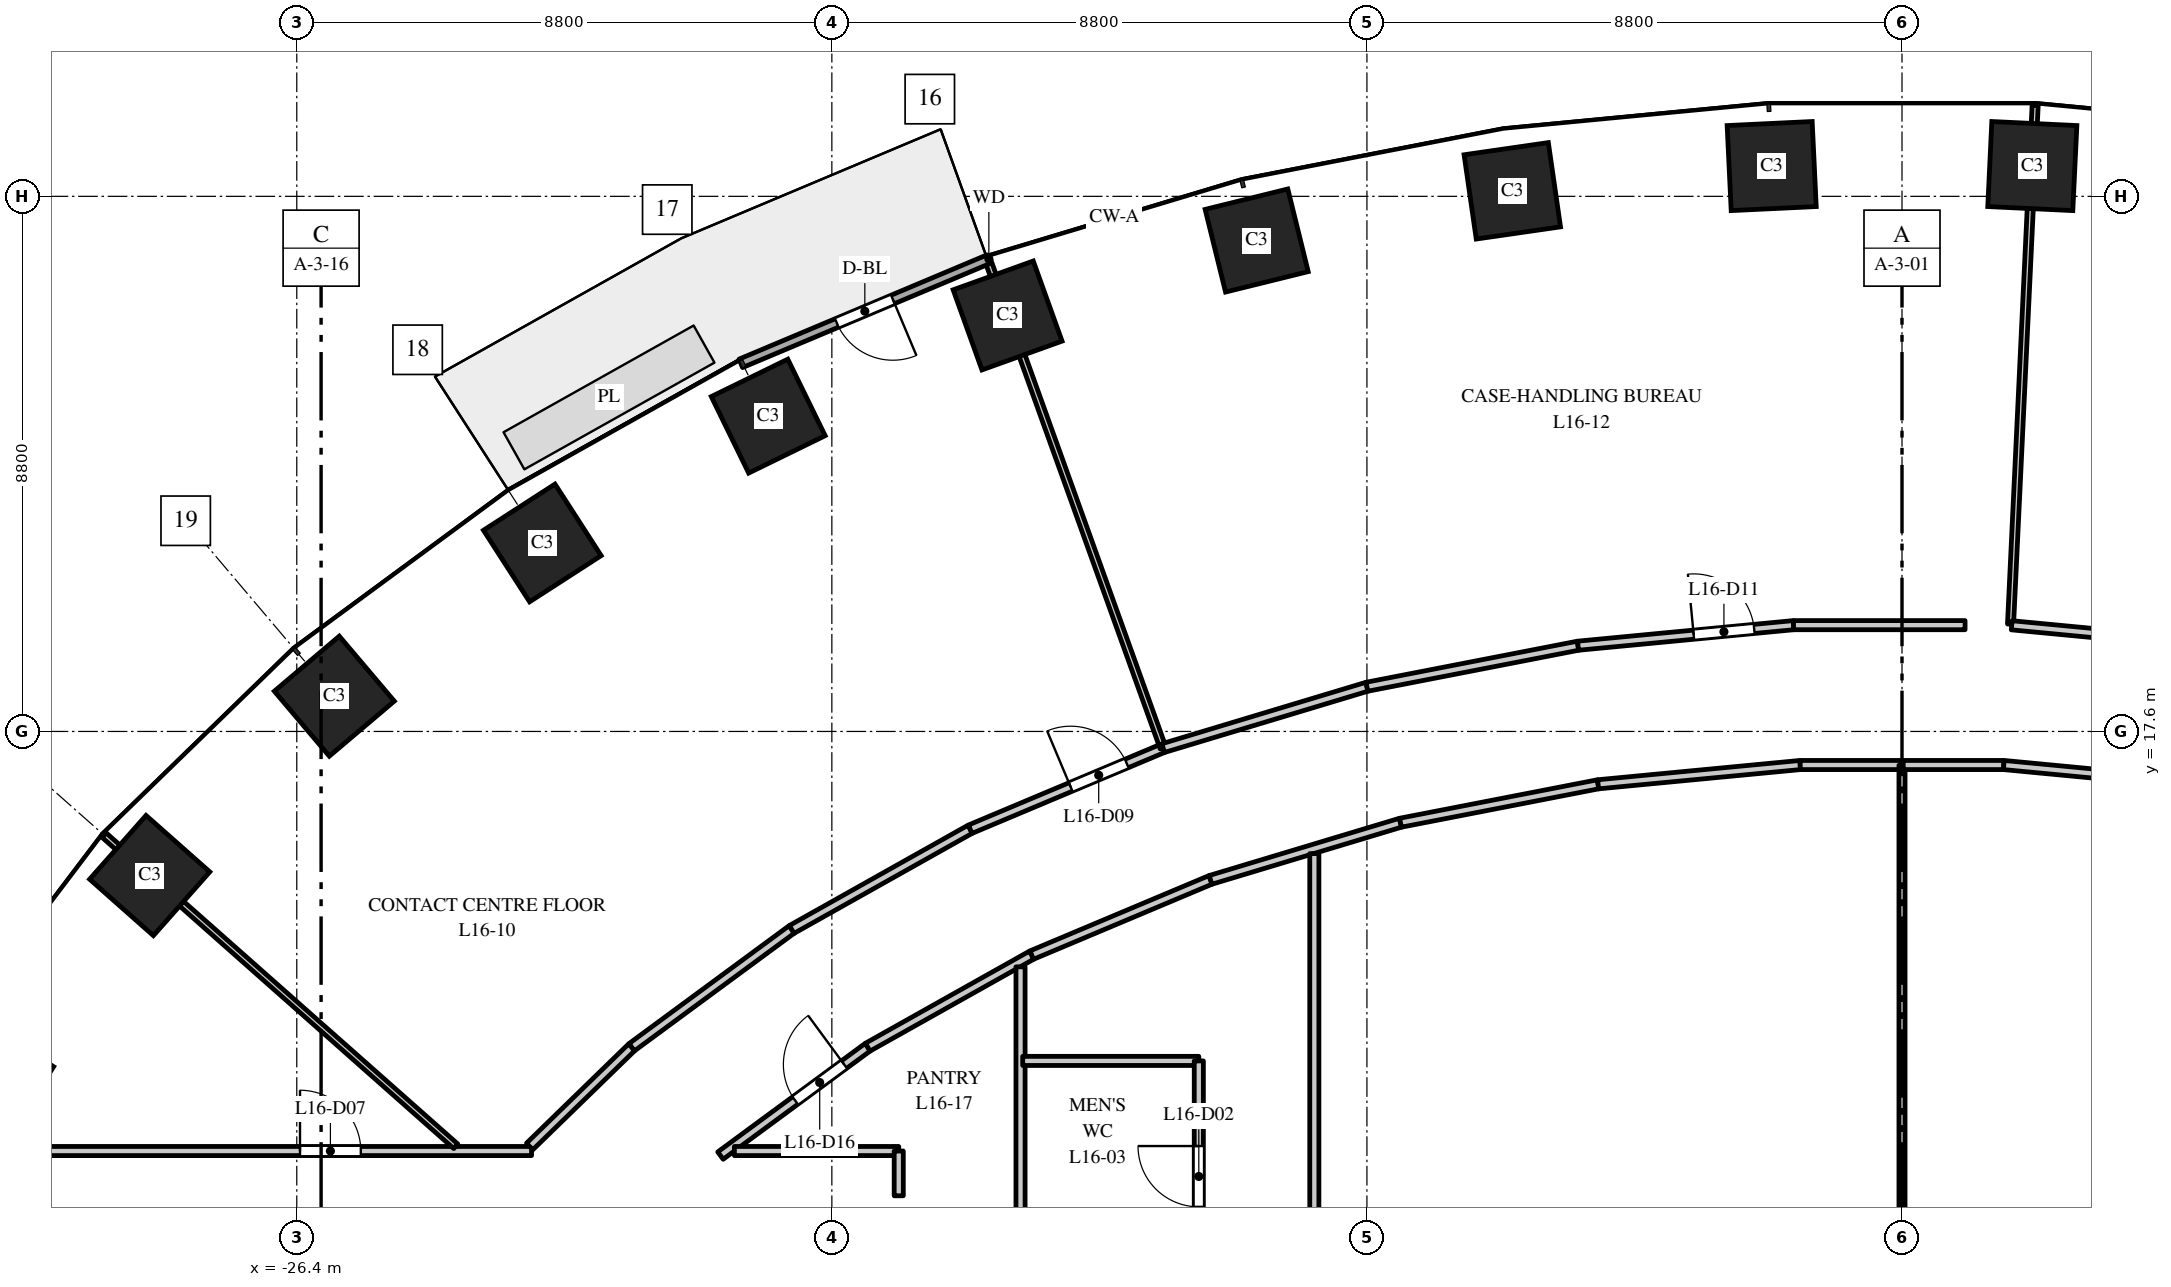
"""IFC4 building model, lengths in metres.
Left out: names, types, materials, properties, quantities, classifications, styles, units other than length and angle.
Written with IfcOpenShell. Run it as: python <this file> out.ifc"""

import sys

from ifc_helpers import new_model, si_unit, direction, frame, frame_2d, origin, origin_2d, place, context, subcontext, project, spatial, rectangle, extrude, element, fill, save


model = new_model("IFC4")
c1 = context("Model", 3, precision=1e-05, world=origin(), true_north=direction((0.0, 1.0)))
c2 = subcontext(c1, "Body", "Model", "MODEL_VIEW")
j1 = project(units=[si_unit("LENGTHUNIT", "METRE"), si_unit("PLANEANGLEUNIT", "RADIAN")], contexts=[c1])
p1 = place(None, origin())
s1 = spatial("IfcSite", under=j1, at=p1, CompositionType="ELEMENT")
p2 = place(p1, origin())
s2 = spatial("IfcBuilding", under=s1, at=p2, CompositionType="ELEMENT")
p3 = place(p2, frame((0.0, 0.0, 74.5)))
s3 = spatial("IfcBuildingStorey", under=s2, at=p3, CompositionType="ELEMENT", Elevation=74.5)
for number, where, z_axis, x_axis in (
    (1, (2.143, 26.898, 0.0), (0.0, 0.0, 1.0), (-0.999, 0.048, 0.0)),
    (2, (-2.143, 26.898, 0.0), (0.0, 0.0, 1.0), (-0.999, -0.048, 0.0)),
    (3, (-6.409, 26.491, 0.0), (0.0, 0.0, 1.0), (-0.99, -0.143, 0.0)),
    (4, (-10.613, 25.674, 0.0), (0.0, 0.0, 1.0), (-0.971, -0.24, 0.0)),
    (5, (-14.709, 24.441, 0.0), (0.0, 0.0, 1.0), (-0.941, -0.338, 0.0)),
    (6, (-18.646, 22.785, 0.0), (0.0, 0.0, 1.0), (-0.898, -0.439, 0.0)),
    (7, (-22.362, 20.7, 0.0), (0.0, 0.0, 1.0), (-0.84, -0.542, 0.0)),
    (8, (-25.783, 18.18, 0.0), (0.0, 0.0, 1.0), (-0.763, -0.646, 0.0)),
    (9, (-28.819, 15.23, 0.0), (0.0, 0.0, 1.0), (-0.663, -0.749, 0.0)),
    (10, (-31.365, 11.871, 0.0), (0.0, 0.0, 1.0), (-0.535, -0.845, 0.0)),
):
    element("IfcColumn", number, at=place(p3, frame(where, z_axis=z_axis, x_axis=x_axis)), inside=s3, PredefinedType="COLUMN", context=c2, shape_type="SweptSolid", body=[
        extrude(rectangle(XDim=1.4, YDim=1.4, at=origin_2d()), origin(), (0.0, 0.0, 1.0), 4.0),
    ])
p4 = place(p3, frame((-15.018, 25.369, 0.0), z_axis=(0.0, 0.0, 1.0), x_axis=(-0.921816985161, -0.387625393736, 0.0)))
e11 = element("IfcWall", 11, at=p4, inside=s3, PredefinedType="STANDARD", context=c2, shape_type="SweptSolid", body=[
    extrude(rectangle(XDim=4.426, YDim=0.15, at=frame_2d((2.213, 0.0))), origin(), (0.0, 0.0, 1.0), 3.7),
])
p5 = place(p4, frame((1.713, 0.0, 0.0)))
e12 = element("IfcOpeningElement", 12, at=p5, cuts=e11, PredefinedType="OPENING", context=c2, shape_type="SweptSolid", body=[
    extrude(rectangle(XDim=1.0, YDim=2.4, at=frame_2d((0.5, 1.2))), frame((0.0, 0.085, 0.0), z_axis=(0.0, -1.0, 0.0), x_axis=(1.0, 0.0, 0.0)), (0.0, 0.0, 1.0), 0.17),
])
p6 = place(p3, frame((-31.5, 10.7, 0.0), z_axis=(0.0, 0.0, 1.0), x_axis=(1.0, 0.0, 0.0)))
e13 = element("IfcWall", 13, at=p6, inside=s3, PredefinedType="PARTITIONING", context=c2, shape_type="SweptSolid", body=[
    extrude(rectangle(XDim=8.961, YDim=0.15, at=frame_2d((4.48, 0.0))), origin(), (0.0, 0.0, 1.0), 3.1),
])
p7 = place(p6, frame((5.153, 0.0, 0.0)))
e14 = element("IfcOpeningElement", 14, at=p7, cuts=e13, PredefinedType="OPENING", context=c2, shape_type="SweptSolid", body=[
    extrude(rectangle(XDim=1.0, YDim=2.1, at=frame_2d((0.5, 1.05))), frame((0.0, 0.085, 0.0), z_axis=(0.0, -1.0, 0.0), x_axis=(1.0, 0.0, 0.0)), (0.0, 0.0, 1.0), 0.17),
])
p8 = place(p3, frame((-29.569, 15.895, 0.0), z_axis=(0.0, 0.0, 1.0), x_axis=(0.748985701008, -0.662586160198, 0.0)))
e15 = element("IfcWall", 15, at=p8, inside=s3, PredefinedType="PARTITIONING", context=c2, shape_type="SweptSolid", body=[
    extrude(rectangle(XDim=7.723, YDim=0.1, at=frame_2d((3.861, 0.0))), origin(), (0.0, 0.0, 1.0), 2.85),
])
p9 = place(p3, frame((-22.57, 10.775, 0.0), z_axis=(0.0, 0.0, 1.0), x_axis=(0.717045582263, 0.697026278527, 0.0)))
e16 = element("IfcWall", 16, at=p9, inside=s3, PredefinedType="PARTITIONING", context=c2, shape_type="SweptSolid", body=[
    extrude(rectangle(XDim=2.342, YDim=0.15, at=frame_2d((1.171, 0.0))), origin(), (0.0, 0.0, 1.0), 3.7),
])
p10 = place(p3, frame((-20.891, 12.407, 0.0), z_axis=(0.0, 0.0, 1.0), x_axis=(0.805303685339, 0.592862525701, 0.0)))
e17 = element("IfcWall", 17, at=p10, inside=s3, PredefinedType="PARTITIONING", context=c2, shape_type="SweptSolid", body=[
    extrude(rectangle(XDim=3.267, YDim=0.15, at=frame_2d((1.634, 0.0))), origin(), (0.0, 0.0, 1.0), 2.75),
])
p11 = place(p3, frame((-19.432, 10.625, 0.0), z_axis=(0.0, 0.0, 1.0), x_axis=(0.805306738654, 0.592858378265, 0.0)))
e18 = element("IfcWall", 18, at=p11, inside=s3, PredefinedType="PARTITIONING", context=c2, shape_type="SweptSolid", body=[
    extrude(rectangle(XDim=3.007, YDim=0.15, at=frame_2d((1.504, 0.0))), origin(), (0.0, 0.0, 1.0), 2.75),
])
p12 = place(p11, frame((1.527, 0.0, 0.0)))
e19 = element("IfcOpeningElement", 19, at=p12, cuts=e18, PredefinedType="OPENING", context=c2, shape_type="SweptSolid", body=[
    extrude(rectangle(XDim=1.0, YDim=2.1, at=frame_2d((0.5, 1.05))), frame((0.0, 0.085, 0.0), z_axis=(0.0, -1.0, 0.0), x_axis=(1.0, 0.0, 0.0)), (0.0, 0.0, 1.0), 0.17),
])
p13 = place(p3, frame((-19.203, 10.7, 0.0), z_axis=(0.0, 0.0, 1.0), x_axis=(1.0, 0.0, 0.0)))
e20 = element("IfcWall", 20, at=p13, inside=s3, PredefinedType="PARTITIONING", context=c2, shape_type="SweptSolid", body=[
    extrude(rectangle(XDim=2.703, YDim=0.15, at=frame_2d((1.352, 0.0))), origin(), (0.0, 0.0, 1.0), 3.7),
])
p14 = place(p3, frame((-18.26, 14.344, 0.0), z_axis=(0.0, 0.0, 1.0), x_axis=(0.871958798398, 0.489579262118, 0.0)))
e21 = element("IfcWall", 21, at=p14, inside=s3, PredefinedType="PARTITIONING", context=c2, shape_type="SweptSolid", body=[
    extrude(rectangle(XDim=3.366, YDim=0.15, at=frame_2d((1.683, 0.0))), origin(), (0.0, 0.0, 1.0), 3.7),
])
p15 = place(p3, frame((-17.01, 12.408, 0.0), z_axis=(0.0, 0.0, 1.0), x_axis=(0.871977874087, 0.489545286059, 0.0)))
e22 = element("IfcWall", 22, at=p15, inside=s3, PredefinedType="PARTITIONING", context=c2, shape_type="SweptSolid", body=[
    extrude(rectangle(XDim=3.093, YDim=0.15, at=frame_2d((1.546, 0.0))), origin(), (0.0, 0.0, 1.0), 3.7),
])
p16 = place(p3, frame((-16.5, 9.964, 0.0), z_axis=(0.0, 0.0, 1.0), x_axis=(0.0, 1.0, 0.0)))
e23 = element("IfcWall", 23, at=p16, inside=s3, PredefinedType="PARTITIONING", context=c2, shape_type="SweptSolid", body=[
    extrude(rectangle(XDim=0.736, YDim=0.15, at=frame_2d((0.368, 0.0))), origin(), (0.0, 0.0, 1.0), 3.7),
])
p17 = place(p3, frame((-15.325, 15.992, 0.0), z_axis=(0.0, 0.0, 1.0), x_axis=(0.921891448612, 0.387448263612, 0.0)))
e24 = element("IfcWall", 24, at=p17, inside=s3, PredefinedType="PARTITIONING", context=c2, shape_type="SweptSolid", body=[
    extrude(rectangle(XDim=3.443, YDim=0.15, at=frame_2d((1.722, 0.0))), origin(), (0.0, 0.0, 1.0), 2.85),
])
p18 = place(p17, frame((1.793, 0.0, 0.0)))
e25 = element("IfcOpeningElement", 25, at=p18, cuts=e24, PredefinedType="OPENING", context=c2, shape_type="SweptSolid", body=[
    extrude(rectangle(XDim=1.0, YDim=2.1, at=frame_2d((0.5, 1.05))), frame((0.0, 0.085, 0.0), z_axis=(0.0, -1.0, 0.0), x_axis=(1.0, 0.0, 0.0)), (0.0, 0.0, 1.0), 0.17),
])
p19 = place(p3, frame((-15.048, 25.383, 0.0), z_axis=(0.0, 0.0, 1.0), x_axis=(0.338300183564, -0.941038248851, 0.0)))
e26 = element("IfcWall", 26, at=p19, inside=s3, PredefinedType="PARTITIONING", context=c2, shape_type="SweptSolid", body=[
    extrude(rectangle(XDim=8.558, YDim=0.1, at=frame_2d((4.279, 0.0))), origin(), (0.0, 0.0, 1.0), 2.85),
])
p20 = place(p3, frame((-14.497, 9.0, 0.0), z_axis=(0.0, 0.0, 1.0), x_axis=(0.0, 1.0, 0.0)))
e27 = element("IfcWall", 27, at=p20, inside=s3, PredefinedType="PARTITIONING", context=c2, shape_type="SweptSolid", body=[
    extrude(rectangle(XDim=4.729, YDim=0.15, at=frame_2d((2.365, 0.0))), origin(), (0.0, 0.0, 1.0), 2.75),
])
p21 = place(p3, frame((-14.461, 12.182, 0.0), z_axis=(0.0, 0.0, 1.0), x_axis=(1.0, 0.0, 0.0)))
e28 = element("IfcWall", 28, at=p21, inside=s3, PredefinedType="PARTITIONING", context=c2, shape_type="SweptSolid", body=[
    extrude(rectangle(XDim=2.896, YDim=0.15, at=frame_2d((1.448, 0.0))), origin(), (0.0, 0.0, 1.0), 3.7),
])
p22 = place(p3, frame((-14.313, 13.922, 0.0), z_axis=(0.0, 0.0, 1.0), x_axis=(0.921799502591, 0.387666966638, 0.0)))
e29 = element("IfcWall", 29, at=p22, inside=s3, PredefinedType="PARTITIONING", context=c2, shape_type="SweptSolid", body=[
    extrude(rectangle(XDim=3.19, YDim=0.15, at=frame_2d((1.595, 0.0))), origin(), (0.0, 0.0, 1.0), 2.85),
])
p23 = place(p3, frame((-12.151, 17.326, 0.0), z_axis=(0.0, 0.0, 1.0), x_axis=(0.957528149021, 0.288339806186, 0.0)))
e30 = element("IfcWall", 30, at=p23, inside=s3, PredefinedType="PARTITIONING", context=c2, shape_type="SweptSolid", body=[
    extrude(rectangle(XDim=3.5, YDim=0.15, at=frame_2d((1.75, 0.0))), origin(), (0.0, 0.0, 1.0), 3.7),
])
p24 = place(p3, frame((-11.565, 3.342, 0.0), z_axis=(0.0, 0.0, 1.0), x_axis=(0.0, 1.0, 0.0)))
e31 = element("IfcWall", 31, at=p24, inside=s3, PredefinedType="PARTITIONING", context=c2, shape_type="SweptSolid", body=[
    extrude(rectangle(XDim=8.84, YDim=0.15, at=frame_2d((4.42, 0.0))), origin(), (0.0, 0.0, 1.0), 2.75),
])
p25 = place(p24, frame((6.44, 0.0, 0.0)))
e32 = element("IfcOpeningElement", 32, at=p25, cuts=e31, PredefinedType="OPENING", context=c2, shape_type="SweptSolid", body=[
    extrude(rectangle(XDim=1.0, YDim=2.1, at=frame_2d((0.5, 1.05))), frame((0.0, 0.085, 0.0), z_axis=(0.0, -1.0, 0.0), x_axis=(1.0, 0.0, 0.0)), (0.0, 0.0, 1.0), 0.17),
])
p26 = place(p24, frame((4.07, 0.0, 0.0)))
e33 = element("IfcOpeningElement", 33, at=p26, cuts=e31, PredefinedType="OPENING", context=c2, shape_type="SweptSolid", body=[
    extrude(rectangle(XDim=1.0, YDim=2.1, at=frame_2d((0.5, 1.05))), frame((0.0, 0.085, 0.0), z_axis=(0.0, -1.0, 0.0), x_axis=(1.0, 0.0, 0.0)), (0.0, 0.0, 1.0), 0.17),
])
p27 = place(p24, frame((0.658, 0.0, 0.0)))
e34 = element("IfcOpeningElement", 34, at=p27, cuts=e31, PredefinedType="OPENING", context=c2, shape_type="SweptSolid", body=[
    extrude(rectangle(XDim=1.0, YDim=2.1, at=frame_2d((0.5, 1.05))), frame((0.0, 0.085, 0.0), z_axis=(0.0, -1.0, 0.0), x_axis=(1.0, 0.0, 0.0)), (0.0, 0.0, 1.0), 0.17),
])
p28 = place(p3, frame((-11.372, 15.159, 0.0), z_axis=(0.0, 0.0, 1.0), x_axis=(0.95757464185, 0.28818536619, 0.0)))
e35 = element("IfcWall", 35, at=p28, inside=s3, PredefinedType="PARTITIONING", context=c2, shape_type="SweptSolid", body=[
    extrude(rectangle(XDim=3.262, YDim=0.15, at=frame_2d((1.631, 0.0))), origin(), (0.0, 0.0, 1.0), 3.7),
])
p29 = place(p3, frame((-9.665, -15.591, 0.0), z_axis=(0.0, 0.0, 1.0), x_axis=(0.0, 1.0, 0.0)))
e36 = element("IfcWall", 36, at=p29, inside=s3, PredefinedType="PARTITIONING", context=c2, shape_type="SweptSolid", body=[
    extrude(rectangle(XDim=31.182, YDim=0.15, at=frame_2d((15.591, 0.0))), origin(), (0.0, 0.0, 1.0), 2.75),
])
p30 = place(p29, frame((0.572, 0.0, 0.0)))
e37 = element("IfcOpeningElement", 37, at=p30, cuts=e36, PredefinedType="OPENING", context=c2, shape_type="SweptSolid", body=[
    extrude(rectangle(XDim=1.0, YDim=2.1, at=frame_2d((0.5, 1.05))), frame((0.0, 0.085, 0.0), z_axis=(0.0, -1.0, 0.0), x_axis=(1.0, 0.0, 0.0)), (0.0, 0.0, 1.0), 0.17),
])
p31 = place(p3, frame((-8.8, 18.335, 0.0), z_axis=(0.0, 0.0, 1.0), x_axis=(0.981620418387, 0.190843795306, 0.0)))
e38 = element("IfcWall", 38, at=p31, inside=s3, PredefinedType="PARTITIONING", context=c2, shape_type="SweptSolid", body=[
    extrude(rectangle(XDim=3.537, YDim=0.15, at=frame_2d((1.769, 0.0))), origin(), (0.0, 0.0, 1.0), 2.85),
])
p32 = place(p3, frame((-8.248, 16.099, 0.0), z_axis=(0.0, 0.0, 1.0), x_axis=(0.981621529558, 0.190838079815, 0.0)))
e39 = element("IfcWall", 39, at=p32, inside=s3, PredefinedType="PARTITIONING", context=c2, shape_type="SweptSolid", body=[
    extrude(rectangle(XDim=3.311, YDim=0.15, at=frame_2d((1.655, 0.0))), origin(), (0.0, 0.0, 1.0), 2.85),
])
p33 = place(p3, frame((-5.328, 19.01, 0.0), z_axis=(0.0, 0.0, 1.0), x_axis=(0.995485604231, 0.094912653366, 0.0)))
e40 = element("IfcWall", 40, at=p33, inside=s3, PredefinedType="PARTITIONING", context=c2, shape_type="SweptSolid", body=[
    extrude(rectangle(XDim=3.56, YDim=0.15, at=frame_2d((1.78, 0.0))), origin(), (0.0, 0.0, 1.0), 3.7),
])
p34 = place(p33, frame((1.91, 0.0, 0.0)))
e41 = element("IfcOpeningElement", 41, at=p34, cuts=e40, PredefinedType="OPENING", context=c2, shape_type="SweptSolid", body=[
    extrude(rectangle(XDim=1.0, YDim=2.1, at=frame_2d((0.5, 1.05))), frame((0.0, 0.085, 0.0), z_axis=(0.0, -1.0, 0.0), x_axis=(1.0, 0.0, 0.0)), (0.0, 0.0, 1.0), 0.17),
])
p35 = place(p3, frame((-4.998, 16.731, 0.0), z_axis=(0.0, 0.0, 1.0), x_axis=(0.995479356205, 0.094978162593, 0.0)))
e42 = element("IfcWall", 42, at=p35, inside=s3, PredefinedType="PARTITIONING", context=c2, shape_type="SweptSolid", body=[
    extrude(rectangle(XDim=3.339, YDim=0.15, at=frame_2d((1.669, 0.0))), origin(), (0.0, 0.0, 1.0), 3.7),
])
p36 = place(p3, frame((-1.784, 19.348, 0.0), z_axis=(0.0, 0.0, 1.0), x_axis=(1.0, 0.0, 0.0)))
e43 = element("IfcWall", 43, at=p36, inside=s3, PredefinedType="PARTITIONING", context=c2, shape_type="SweptSolid", body=[
    extrude(rectangle(XDim=2.821, YDim=0.15, at=frame_2d((1.411, 0.0))), origin(), (0.0, 0.0, 1.0), 2.85),
])
p37 = place(p3, frame((-1.674, 17.048, 0.0), z_axis=(0.0, 0.0, 1.0), x_axis=(1.0, 0.0, 0.0)))
e44 = element("IfcWall", 44, at=p37, inside=s3, PredefinedType="PARTITIONING", context=c2, shape_type="SweptSolid", body=[
    extrude(rectangle(XDim=1.674, YDim=0.15, at=frame_2d((0.837, 0.0))), origin(), (0.0, 0.0, 1.0), 2.85),
])
p38 = place(p3, frame((0.0, 7.504, 0.0), z_axis=(0.0, 0.0, 1.0), x_axis=(0.0, 1.0, 0.0)))
e45 = element("IfcWall", 45, at=p38, inside=s3, PredefinedType="PARTITIONING", context=c2, shape_type="SweptSolid", body=[
    extrude(rectangle(XDim=9.54, YDim=0.1, at=frame_2d((4.77, 0.0))), origin(), (0.0, 0.0, 1.0), 3.7),
])
p39 = place(p3, frame((0.02, 17.048, 0.0), z_axis=(0.0, 0.0, 1.0), x_axis=(1.0, 0.0, 0.0)))
e46 = element("IfcWall", 46, at=p39, inside=s3, PredefinedType="PARTITIONING", context=c2, shape_type="SweptSolid", body=[
    extrude(rectangle(XDim=1.654, YDim=0.15, at=frame_2d((0.827, 0.0))), origin(), (0.0, 0.0, 1.0), 3.7),
])
p40 = place(p3, frame((1.674, 17.048, 0.0), z_axis=(0.0, 0.0, 1.0), x_axis=(0.995479356205, -0.094978162593, 0.0)))
e47 = element("IfcWall", 47, at=p40, inside=s3, PredefinedType="PARTITIONING", context=c2, shape_type="SweptSolid", body=[
    extrude(rectangle(XDim=3.339, YDim=0.15, at=frame_2d((1.669, 0.0))), origin(), (0.0, 0.0, 1.0), 2.85),
])
p41 = place(p3, frame((1.785, 19.365, 0.0), z_axis=(0.0, 0.0, 1.0), x_axis=(0.04741307074, 0.998875367963, 0.0)))
e48 = element("IfcWall", 48, at=p41, inside=s3, PredefinedType="PARTITIONING", context=c2, shape_type="SweptSolid", body=[
    extrude(rectangle(XDim=8.542, YDim=0.1, at=frame_2d((4.271, 0.0))), origin(), (0.0, 0.0, 1.0), 2.85),
])
p42 = place(p3, frame((1.804, 19.346, 0.0), z_axis=(0.0, 0.0, 1.0), x_axis=(0.99548678928, -0.094900223226, 0.0)))
e49 = element("IfcWall", 49, at=p42, inside=s3, PredefinedType="PARTITIONING", context=c2, shape_type="SweptSolid", body=[
    extrude(rectangle(XDim=3.54, YDim=0.15, at=frame_2d((1.77, 0.0))), origin(), (0.0, 0.0, 1.0), 2.85),
])
p43 = place(p5, origin())
e50 = element("IfcDoor", 50, at=p43, inside=s3, OperationType="SINGLE_SWING_LEFT", PredefinedType="DOOR", context=c2, shape_type="SweptSolid", body=[
    extrude(rectangle(XDim=1.0, YDim=2.4, at=frame_2d((0.5, 1.2))), frame((0.0, 0.025, 0.0), z_axis=(0.0, -1.0, 0.0), x_axis=(1.0, 0.0, 0.0)), (0.0, 0.0, 1.0), 0.05),
])
fill(e12, e50)
p44 = place(p25, origin())
e51 = element("IfcDoor", 51, at=p44, inside=s3, OperationType="SINGLE_SWING_RIGHT", PredefinedType="DOOR", context=c2, shape_type="SweptSolid", body=[
    extrude(rectangle(XDim=1.0, YDim=2.1, at=frame_2d((0.5, 1.05))), frame((0.0, 0.025, 0.0), z_axis=(0.0, -1.0, 0.0), x_axis=(1.0, 0.0, 0.0)), (0.0, 0.0, 1.0), 0.05),
])
fill(e32, e51)
p45 = place(p7, origin())
e52 = element("IfcDoor", 52, at=p45, inside=s3, OperationType="SINGLE_SWING_LEFT", PredefinedType="DOOR", context=c2, shape_type="SweptSolid", body=[
    extrude(rectangle(XDim=1.0, YDim=2.1, at=frame_2d((0.5, 1.05))), frame((0.0, 0.025, 0.0), z_axis=(0.0, -1.0, 0.0), x_axis=(1.0, 0.0, 0.0)), (0.0, 0.0, 1.0), 0.05),
])
fill(e14, e52)
p46 = place(p18, origin())
e53 = element("IfcDoor", 53, at=p46, inside=s3, OperationType="SINGLE_SWING_LEFT", PredefinedType="DOOR", context=c2, shape_type="SweptSolid", body=[
    extrude(rectangle(XDim=1.0, YDim=2.1, at=frame_2d((0.5, 1.05))), frame((0.0, 0.025, 0.0), z_axis=(0.0, -1.0, 0.0), x_axis=(1.0, 0.0, 0.0)), (0.0, 0.0, 1.0), 0.05),
])
fill(e25, e53)
p47 = place(p34, origin())
e54 = element("IfcDoor", 54, at=p47, inside=s3, OperationType="SINGLE_SWING_LEFT", PredefinedType="DOOR", context=c2, shape_type="SweptSolid", body=[
    extrude(rectangle(XDim=1.0, YDim=2.1, at=frame_2d((0.5, 1.05))), frame((0.0, 0.025, 0.0), z_axis=(0.0, -1.0, 0.0), x_axis=(1.0, 0.0, 0.0)), (0.0, 0.0, 1.0), 0.05),
])
fill(e41, e54)
p48 = place(p12, origin())
e55 = element("IfcDoor", 55, at=p48, inside=s3, OperationType="SINGLE_SWING_RIGHT", PredefinedType="DOOR", context=c2, shape_type="SweptSolid", body=[
    extrude(rectangle(XDim=1.0, YDim=2.1, at=frame_2d((0.5, 1.05))), frame((0.0, 0.025, 0.0), z_axis=(0.0, -1.0, 0.0), x_axis=(1.0, 0.0, 0.0)), (0.0, 0.0, 1.0), 0.05),
])
fill(e19, e55)
save(model, sys.argv[1])
